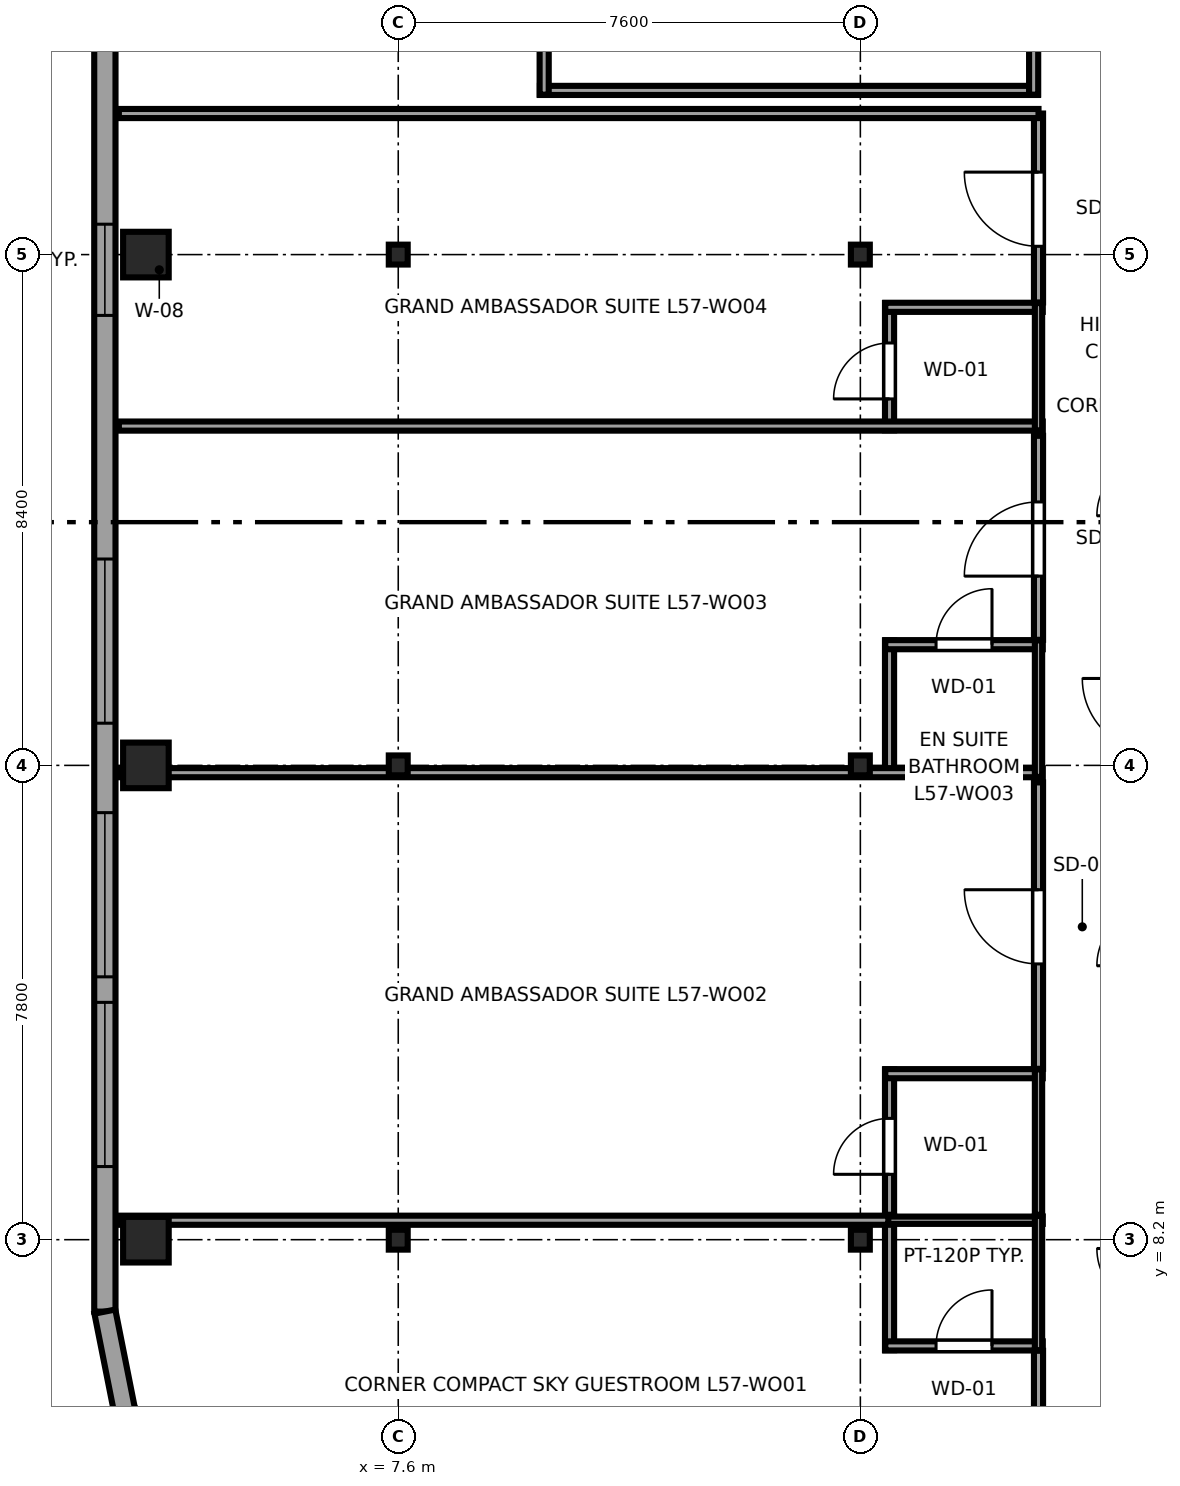
"""IFC4 building model, lengths in metres.
Left out: names, types, materials, properties, quantities, classifications, styles, units other than length and angle.
Written with IfcOpenShell. Run it as: python <this file> out.ifc"""

import sys

from ifc_helpers import new_model, si_unit, direction, frame, frame_2d, origin, origin_2d, place, context, subcontext, project, spatial, rectangle, i_section, extrude, source, transform, mapped, element, fill, save


model = new_model("IFC4")
c1 = context("Model", 3, precision=1e-05, world=origin(), true_north=direction((0.0, 1.0)))
c2 = subcontext(c1, "Body", "Model", "MODEL_VIEW")
j1 = project(units=[si_unit("LENGTHUNIT", "METRE"), si_unit("PLANEANGLEUNIT", "RADIAN")], contexts=[c1])
p1 = place(None, origin())
s1 = spatial("IfcSite", under=j1, at=p1, CompositionType="ELEMENT")
p2 = place(p1, origin())
s2 = spatial("IfcBuilding", under=s1, at=p2, CompositionType="ELEMENT")
p3 = place(p2, frame((0.0, 0.0, 216.8)))
s3 = spatial("IfcBuildingStorey", under=s2, at=p3, CompositionType="ELEMENT", Elevation=216.8)
m1 = source(origin(), c2, "Body", "SweptSolid", [
    extrude(rectangle(XDim=0.75, YDim=0.75, at=origin_2d()), origin(), (0.0, 0.0, 1.0), 3.55),
])
for number, where, z_axis, x_axis in (
    (1, (3.45, 8.2, 0.0), (0.0, 0.0, 1.0), (1.0, 0.0, 0.0)),
    (2, (3.45, 16.0, 0.0), (0.0, 0.0, 1.0), (1.0, 0.0, 0.0)),
    (3, (3.45, 24.4, 0.0), (0.0, 0.0, 1.0), (1.0, 0.0, 0.0)),
):
    element("IfcColumn", number, at=place(p3, frame(where, z_axis=z_axis, x_axis=x_axis)), inside=s3, PredefinedType="COLUMN", context=c2, shape_type="MappedRepresentation", body=[
        mapped(m1, transform((0.0, 0.0, 0.0), x_axis=(1.0, 0.0, 0.0), y_axis=(0.0, 1.0, 0.0), z_axis=(0.0, 0.0, 1.0), scale=1.0)),
    ])
m2 = source(origin(), c2, "Body", "SweptSolid", [
    extrude(i_section(OverallWidth=0.311, OverallDepth=0.327, WebThickness=0.016, FlangeThickness=0.025, FilletRadius=0.017, at=origin_2d()), origin(), (0.0, 0.0, 1.0), 3.55),
])
for number, where, z_axis, x_axis in (
    (4, (7.6, 8.2, 0.0), (0.0, 0.0, 1.0), (1.0, 0.0, 0.0)),
    (5, (7.6, 16.0, 0.0), (0.0, 0.0, 1.0), (1.0, 0.0, 0.0)),
    (6, (7.6, 24.4, 0.0), (0.0, 0.0, 1.0), (1.0, 0.0, 0.0)),
    (7, (15.2, 8.2, 0.0), (0.0, 0.0, 1.0), (1.0, 0.0, 0.0)),
    (8, (15.2, 16.0, 0.0), (0.0, 0.0, 1.0), (1.0, 0.0, 0.0)),
    (9, (15.2, 24.4, 0.0), (0.0, 0.0, 1.0), (1.0, 0.0, 0.0)),
):
    element("IfcColumn", number, at=place(p3, frame(where, z_axis=z_axis, x_axis=x_axis)), inside=s3, PredefinedType="COLUMN", context=c2, shape_type="MappedRepresentation", body=[
        mapped(m2, transform((0.0, 0.0, 0.0), x_axis=(1.0, 0.0, 0.0), y_axis=(0.0, 1.0, 0.0), z_axis=(0.0, 0.0, 1.0), scale=1.0)),
    ])
p4 = place(p3, frame((3.1, 5.385, 0.0), z_axis=(0.0, 0.0, 1.0), x_axis=(0.555623290322, -0.831434158098, 0.0)))
e10 = element("IfcWall", 10, at=p4, inside=s3, PredefinedType="SOLIDWALL", context=c2, shape_type="SweptSolid", body=[
    extrude(rectangle(XDim=1.647, YDim=0.35, at=frame_2d((0.824, 0.0))), origin(), (0.0, 0.0, 1.0), 2.9),
])
p5 = place(p3, frame((2.775, 41.583, 0.0), z_axis=(0.0, 0.0, 1.0), x_axis=(0.0, -1.0, 0.0)))
e11 = element("IfcWall", 11, at=p5, inside=s3, PredefinedType="SOLIDWALL", context=c2, shape_type="SweptSolid", body=[
    extrude(rectangle(XDim=34.566, YDim=0.35, at=frame_2d((17.283, 0.0))), origin(), (0.0, 0.0, 1.0), 3.37),
])
p6 = place(p5, frame((10.227, 0.0, 0.68)))
e12 = element("IfcOpeningElement", 12, at=p6, cuts=e11, PredefinedType="OPENING", context=c2, shape_type="SweptSolid", body=[
    extrude(rectangle(XDim=2.7, YDim=1.95, at=frame_2d((1.35, 0.975))), frame((0.0, 0.185, 0.0), z_axis=(0.0, -1.0, 0.0), x_axis=(1.0, 0.0, 0.0)), (0.0, 0.0, 1.0), 0.37),
])
p7 = place(p5, frame((22.189, 0.0, 0.68)))
e13 = element("IfcOpeningElement", 13, at=p7, cuts=e11, PredefinedType="OPENING", context=c2, shape_type="SweptSolid", body=[
    extrude(rectangle(XDim=2.7, YDim=1.95, at=frame_2d((1.35, 0.975))), frame((0.0, 0.185, 0.0), z_axis=(0.0, -1.0, 0.0), x_axis=(1.0, 0.0, 0.0)), (0.0, 0.0, 1.0), 0.37),
])
p8 = place(p5, frame((26.36, 0.0, 0.68)))
e14 = element("IfcOpeningElement", 14, at=p8, cuts=e11, PredefinedType="OPENING", context=c2, shape_type="SweptSolid", body=[
    extrude(rectangle(XDim=2.7, YDim=1.95, at=frame_2d((1.35, 0.975))), frame((0.0, 0.185, 0.0), z_axis=(0.0, -1.0, 0.0), x_axis=(1.0, 0.0, 0.0)), (0.0, 0.0, 1.0), 0.37),
])
p9 = place(p5, frame((29.48, 0.0, 0.68)))
e15 = element("IfcOpeningElement", 15, at=p9, cuts=e11, PredefinedType="OPENING", context=c2, shape_type="SweptSolid", body=[
    extrude(rectangle(XDim=2.7, YDim=1.95, at=frame_2d((1.35, 0.975))), frame((0.0, 0.185, 0.0), z_axis=(0.0, -1.0, 0.0), x_axis=(1.0, 0.0, 0.0)), (0.0, 0.0, 1.0), 0.37),
])
p10 = place(p5, frame((16.683, 0.0, 0.62)))
e16 = element("IfcOpeningElement", 16, at=p10, cuts=e11, PredefinedType="OPENING", context=c2, shape_type="SweptSolid", body=[
    extrude(rectangle(XDim=1.5, YDim=1.55, at=frame_2d((0.75, 0.775))), frame((0.0, 0.185, 0.0), z_axis=(0.0, -1.0, 0.0), x_axis=(1.0, 0.0, 0.0)), (0.0, 0.0, 1.0), 0.37),
])
p11 = place(p3, frame((2.775, 7.017, 0.0), z_axis=(0.0, 0.0, 1.0), x_axis=(0.195072403631, -0.980788844421, 0.0)))
e17 = element("IfcWall", 17, at=p11, inside=s3, PredefinedType="SOLIDWALL", context=c2, shape_type="SweptSolid", body=[
    extrude(rectangle(XDim=1.665, YDim=0.35, at=frame_2d((0.832, 0.0))), origin(), (0.0, 0.0, 1.0), 3.37),
])
p12 = place(p3, frame((15.68, 6.383, 0.0), z_axis=(0.0, 0.0, 1.0), x_axis=(0.0, 1.0, 0.0)))
e18 = element("IfcWall", 18, at=p12, inside=s3, PredefinedType="PARTITIONING", context=c2, shape_type="SweptSolid", body=[
    extrude(rectangle(XDim=2.207, YDim=0.15, at=frame_2d((1.104, 0.0))), origin(), (0.0, 0.0, 1.0), 3.37),
])
p13 = place(p3, frame((15.61, 6.453, 0.0), z_axis=(0.0, 0.0, 1.0), x_axis=(1.0, 0.0, 0.0)))
e19 = element("IfcWall", 19, at=p13, inside=s3, PredefinedType="PARTITIONING", context=c2, shape_type="SweptSolid", body=[
    extrude(rectangle(XDim=2.59, YDim=0.15, at=frame_2d((1.295, 0.0))), origin(), (0.0, 0.0, 1.0), 3.37),
])
p14 = place(p13, frame((0.835, 0.0, 0.0)))
e20 = element("IfcOpeningElement", 20, at=p14, cuts=e19, PredefinedType="OPENING", context=c2, shape_type="SweptSolid", body=[
    extrude(rectangle(XDim=0.92, YDim=2.01, at=frame_2d((0.46, 1.005))), frame((0.0, 0.085, 0.0), z_axis=(0.0, -1.0, 0.0), x_axis=(1.0, 0.0, 0.0)), (0.0, 0.0, 1.0), 0.17),
])
p15 = place(p3, frame((15.61, 8.52, 0.0), z_axis=(0.0, 0.0, 1.0), x_axis=(1.0, 0.0, 0.0)))
e21 = element("IfcWall", 21, at=p15, inside=s3, PredefinedType="PLUMBINGWALL", context=c2, shape_type="SweptSolid", body=[
    extrude(rectangle(XDim=2.59, YDim=0.12, at=frame_2d((1.295, 0.0))), origin(), (0.0, 0.0, 1.0), 3.37),
])
p16 = place(p3, frame((18.13, 6.383, 0.0), z_axis=(0.0, 0.0, 1.0), x_axis=(0.0, 1.0, 0.0)))
e22 = element("IfcWall", 22, at=p16, inside=s3, PredefinedType="PLUMBINGWALL", context=c2, shape_type="SweptSolid", body=[
    extrude(rectangle(XDim=2.207, YDim=0.12, at=frame_2d((1.104, 0.0))), origin(), (0.0, 0.0, 1.0), 3.37),
])
p17 = place(p3, frame((15.68, 8.61, 0.0), z_axis=(0.0, 0.0, 1.0), x_axis=(0.0, 1.0, 0.0)))
e23 = element("IfcWall", 23, at=p17, inside=s3, PredefinedType="PARTITIONING", context=c2, shape_type="SweptSolid", body=[
    extrude(rectangle(XDim=2.39, YDim=0.15, at=frame_2d((1.195, 0.0))), origin(), (0.0, 0.0, 1.0), 3.37),
])
p18 = place(p17, frame((0.665, 0.0, 0.0)))
e24 = element("IfcOpeningElement", 24, at=p18, cuts=e23, PredefinedType="OPENING", context=c2, shape_type="SweptSolid", body=[
    extrude(rectangle(XDim=0.92, YDim=2.01, at=frame_2d((0.46, 1.005))), frame((0.0, 0.085, 0.0), z_axis=(0.0, -1.0, 0.0), x_axis=(1.0, 0.0, 0.0)), (0.0, 0.0, 1.0), 0.17),
])
p19 = place(p3, frame((15.61, 10.93, 0.0), z_axis=(0.0, 0.0, 1.0), x_axis=(1.0, 0.0, 0.0)))
e25 = element("IfcWall", 25, at=p19, inside=s3, PredefinedType="PARTITIONING", context=c2, shape_type="SweptSolid", body=[
    extrude(rectangle(XDim=2.59, YDim=0.15, at=frame_2d((1.295, 0.0))), origin(), (0.0, 0.0, 1.0), 3.37),
])
p20 = place(p3, frame((18.13, 8.61, 0.0), z_axis=(0.0, 0.0, 1.0), x_axis=(0.0, 1.0, 0.0)))
e26 = element("IfcWall", 26, at=p20, inside=s3, PredefinedType="PLUMBINGWALL", context=c2, shape_type="SweptSolid", body=[
    extrude(rectangle(XDim=2.39, YDim=0.12, at=frame_2d((1.195, 0.0))), origin(), (0.0, 0.0, 1.0), 3.37),
])
p21 = place(p3, frame((15.68, 15.81, 0.0), z_axis=(0.0, 0.0, 1.0), x_axis=(0.0, 1.0, 0.0)))
e27 = element("IfcWall", 27, at=p21, inside=s3, PredefinedType="PARTITIONING", context=c2, shape_type="SweptSolid", body=[
    extrude(rectangle(XDim=2.245, YDim=0.15, at=frame_2d((1.123, 0.0))), origin(), (0.0, 0.0, 1.0), 3.37),
])
p22 = place(p3, frame((3.005, 15.88, 0.0), z_axis=(0.0, 0.0, 1.0), x_axis=(1.0, 0.0, 0.0)))
e28 = element("IfcWall", 28, at=p22, inside=s3, PredefinedType="PARTITIONING", context=c2, shape_type="SweptSolid", body=[
    extrude(rectangle(XDim=15.195, YDim=0.15, at=frame_2d((7.598, 0.0))), origin(), (0.0, 0.0, 1.0), 2.758),
])
p23 = place(p3, frame((15.61, 17.985, 0.0), z_axis=(0.0, 0.0, 1.0), x_axis=(1.0, 0.0, 0.0)))
e29 = element("IfcWall", 29, at=p23, inside=s3, PredefinedType="PARTITIONING", context=c2, shape_type="SweptSolid", body=[
    extrude(rectangle(XDim=2.59, YDim=0.15, at=frame_2d((1.295, 0.0))), origin(), (0.0, 0.0, 1.0), 3.37),
])
p24 = place(p23, frame((0.835, 0.0, 0.0)))
e30 = element("IfcOpeningElement", 30, at=p24, cuts=e29, PredefinedType="OPENING", context=c2, shape_type="SweptSolid", body=[
    extrude(rectangle(XDim=0.92, YDim=2.01, at=frame_2d((0.46, 1.005))), frame((0.0, 0.085, 0.0), z_axis=(0.0, -1.0, 0.0), x_axis=(1.0, 0.0, 0.0)), (0.0, 0.0, 1.0), 0.17),
])
p25 = place(p3, frame((18.13, 15.81, 0.0), z_axis=(0.0, 0.0, 1.0), x_axis=(0.0, 1.0, 0.0)))
e31 = element("IfcWall", 31, at=p25, inside=s3, PredefinedType="PLUMBINGWALL", context=c2, shape_type="SweptSolid", body=[
    extrude(rectangle(XDim=2.245, YDim=0.12, at=frame_2d((1.123, 0.0))), origin(), (0.0, 0.0, 1.0), 3.37),
])
p26 = place(p3, frame((15.68, 21.51, 0.0), z_axis=(0.0, 0.0, 1.0), x_axis=(0.0, 1.0, 0.0)))
e32 = element("IfcWall", 32, at=p26, inside=s3, PredefinedType="PARTITIONING", context=c2, shape_type="SweptSolid", body=[
    extrude(rectangle(XDim=2.093, YDim=0.15, at=frame_2d((1.046, 0.0))), origin(), (0.0, 0.0, 1.0), 3.37),
])
p27 = place(p26, frame((0.517, 0.0, 0.0)))
e33 = element("IfcOpeningElement", 33, at=p27, cuts=e32, PredefinedType="OPENING", context=c2, shape_type="SweptSolid", body=[
    extrude(rectangle(XDim=0.92, YDim=2.01, at=frame_2d((0.46, 1.005))), frame((0.0, 0.085, 0.0), z_axis=(0.0, -1.0, 0.0), x_axis=(1.0, 0.0, 0.0)), (0.0, 0.0, 1.0), 0.17),
])
p28 = place(p3, frame((3.005, 21.58, 0.0), z_axis=(0.0, 0.0, 1.0), x_axis=(1.0, 0.0, 0.0)))
e34 = element("IfcWall", 34, at=p28, inside=s3, PredefinedType="PARTITIONING", context=c2, shape_type="SweptSolid", body=[
    extrude(rectangle(XDim=15.195, YDim=0.15, at=frame_2d((7.598, 0.0))), origin(), (0.0, 0.0, 1.0), 3.37),
])
p29 = place(p3, frame((15.61, 23.533, 0.0), z_axis=(0.0, 0.0, 1.0), x_axis=(1.0, 0.0, 0.0)))
e35 = element("IfcWall", 35, at=p29, inside=s3, PredefinedType="PARTITIONING", context=c2, shape_type="SweptSolid", body=[
    extrude(rectangle(XDim=2.59, YDim=0.15, at=frame_2d((1.295, 0.0))), origin(), (0.0, 0.0, 1.0), 3.37),
])
p30 = place(p3, frame((18.13, 21.51, 0.0), z_axis=(0.0, 0.0, 1.0), x_axis=(0.0, 1.0, 0.0)))
e36 = element("IfcWall", 36, at=p30, inside=s3, PredefinedType="PLUMBINGWALL", context=c2, shape_type="SweptSolid", body=[
    extrude(rectangle(XDim=2.093, YDim=0.12, at=frame_2d((1.046, 0.0))), origin(), (0.0, 0.0, 1.0), 3.37),
])
p31 = place(p3, frame((18.13, 3.005, 0.0), z_axis=(0.0, 0.0, 1.0), x_axis=(0.0, 1.0, 0.0)))
e37 = element("IfcWall", 37, at=p31, inside=s3, PredefinedType="PARTITIONING", context=c2, shape_type="SweptSolid", body=[
    extrude(rectangle(XDim=3.368, YDim=0.15, at=frame_2d((1.684, 0.0))), origin(), (0.0, 0.0, 1.0), 3.37),
])
p32 = place(p31, frame((1.082, 0.0, 0.0)))
e38 = element("IfcOpeningElement", 38, at=p32, cuts=e37, PredefinedType="OPENING", context=c2, shape_type="SweptSolid", body=[
    extrude(rectangle(XDim=1.22, YDim=2.08, at=frame_2d((0.61, 1.04))), frame((0.0, 0.085, 0.0), z_axis=(0.0, -1.0, 0.0), x_axis=(1.0, 0.0, 0.0)), (0.0, 0.0, 1.0), 0.17),
])
p33 = place(p3, frame((3.005, 8.52, 0.0), z_axis=(0.0, 0.0, 1.0), x_axis=(1.0, 0.0, 0.0)))
e39 = element("IfcWall", 39, at=p33, inside=s3, PredefinedType="PARTITIONING", context=c2, shape_type="SweptSolid", body=[
    extrude(rectangle(XDim=12.655, YDim=0.15, at=frame_2d((6.328, 0.0))), origin(), (0.0, 0.0, 1.0), 3.37),
])
p34 = place(p3, frame((18.13, 11.01, 0.0), z_axis=(0.0, 0.0, 1.0), x_axis=(0.0, 1.0, 0.0)))
e40 = element("IfcWall", 40, at=p34, inside=s3, PredefinedType="PARTITIONING", context=c2, shape_type="SweptSolid", body=[
    extrude(rectangle(XDim=4.71, YDim=0.15, at=frame_2d((2.355, 0.0))), origin(), (0.0, 0.0, 1.0), 3.37),
])
p35 = place(p34, frame((1.725, 0.0, 0.0)))
e41 = element("IfcOpeningElement", 41, at=p35, cuts=e40, PredefinedType="OPENING", context=c2, shape_type="SweptSolid", body=[
    extrude(rectangle(XDim=1.22, YDim=2.08, at=frame_2d((0.61, 1.04))), frame((0.0, 0.085, 0.0), z_axis=(0.0, -1.0, 0.0), x_axis=(1.0, 0.0, 0.0)), (0.0, 0.0, 1.0), 0.17),
])
p36 = place(p3, frame((18.13, 18.065, 0.0), z_axis=(0.0, 0.0, 1.0), x_axis=(0.0, 1.0, 0.0)))
e42 = element("IfcWall", 42, at=p36, inside=s3, PredefinedType="PARTITIONING", context=c2, shape_type="SweptSolid", body=[
    extrude(rectangle(XDim=3.355, YDim=0.15, at=frame_2d((1.677, 0.0))), origin(), (0.0, 0.0, 1.0), 3.37),
])
p37 = place(p36, frame((1.048, 0.0, 0.0)))
e43 = element("IfcOpeningElement", 43, at=p37, cuts=e42, PredefinedType="OPENING", context=c2, shape_type="SweptSolid", body=[
    extrude(rectangle(XDim=1.22, YDim=2.08, at=frame_2d((0.61, 1.04))), frame((0.0, 0.085, 0.0), z_axis=(0.0, -1.0, 0.0), x_axis=(1.0, 0.0, 0.0)), (0.0, 0.0, 1.0), 0.17),
])
p38 = place(p3, frame((18.13, 23.613, 0.0), z_axis=(0.0, 0.0, 1.0), x_axis=(0.0, 1.0, 0.0)))
e44 = element("IfcWall", 44, at=p38, inside=s3, PredefinedType="PARTITIONING", context=c2, shape_type="SweptSolid", body=[
    extrude(rectangle(XDim=3.107, YDim=0.15, at=frame_2d((1.553, 0.0))), origin(), (0.0, 0.0, 1.0), 3.37),
])
p39 = place(p38, frame((0.924, 0.0, 0.0)))
e45 = element("IfcOpeningElement", 45, at=p39, cuts=e44, PredefinedType="OPENING", context=c2, shape_type="SweptSolid", body=[
    extrude(rectangle(XDim=1.22, YDim=2.08, at=frame_2d((0.61, 1.04))), frame((0.0, 0.085, 0.0), z_axis=(0.0, -1.0, 0.0), x_axis=(1.0, 0.0, 0.0)), (0.0, 0.0, 1.0), 0.17),
])
p40 = place(p3, frame((3.005, 26.72, 0.0), z_axis=(0.0, 0.0, 1.0), x_axis=(1.0, 0.0, 0.0)))
e46 = element("IfcWall", 46, at=p40, inside=s3, PredefinedType="PARTITIONING", context=c2, shape_type="SweptSolid", body=[
    extrude(rectangle(XDim=15.125, YDim=0.15, at=frame_2d((7.562, 0.0))), origin(), (0.0, 0.0, 1.0), 3.37),
])
p41 = place(p3, frame((9.93, 27.1, 0.0), z_axis=(0.0, 0.0, 1.0), x_axis=(1.0, 0.0, 0.0)))
e47 = element("IfcWall", 47, at=p41, inside=s3, PredefinedType="PARTITIONING", context=c2, shape_type="SweptSolid", body=[
    extrude(rectangle(XDim=8.19, YDim=0.15, at=frame_2d((4.095, 0.0))), origin(), (0.0, 0.0, 1.0), 3.37),
])
for number, where, z_axis, x_axis in (
    (48, (10.0, 27.03, 0.0), (0.0, 0.0, 1.0), (0.0, 1.0, 0.0)),
    (49, (18.05, 27.03, 0.0), (0.0, 0.0, 1.0), (0.0, 1.0, 0.0)),
):
    element("IfcWall", number, at=place(p3, frame(where, z_axis=z_axis, x_axis=x_axis)), inside=s3, PredefinedType="PARTITIONING", context=c2, shape_type="SweptSolid", body=[
        extrude(rectangle(XDim=2.79, YDim=0.15, at=frame_2d((1.395, 0.0))), origin(), (0.0, 0.0, 1.0), 3.37),
    ])
m3 = source(origin(), c2, "Body", "SweptSolid", [
    extrude(rectangle(XDim=2.7, YDim=1.95, at=frame_2d((1.35, 0.975))), frame((0.0, 0.09, 0.0), z_axis=(0.0, -1.0, 0.0), x_axis=(1.0, 0.0, 0.0)), (0.0, 0.0, 1.0), 0.06),
])
p42 = place(p7, origin())
e50 = element("IfcWindow", 50, at=p42, inside=s3, PartitioningType="TRIPLE_PANEL_HORIZONTAL", PredefinedType="WINDOW", context=c2, shape_type="MappedRepresentation", body=[
    mapped(m3, transform((0.0, 0.0, 0.0), x_axis=(1.0, 0.0, 0.0), y_axis=(0.0, 1.0, 0.0), z_axis=(0.0, 0.0, 1.0), scale=1.0)),
])
fill(e13, e50)
p43 = place(p8, origin())
e51 = element("IfcWindow", 51, at=p43, inside=s3, PartitioningType="TRIPLE_PANEL_HORIZONTAL", PredefinedType="WINDOW", context=c2, shape_type="MappedRepresentation", body=[
    mapped(m3, transform((0.0, 0.0, 0.0), x_axis=(1.0, 0.0, 0.0), y_axis=(0.0, 1.0, 0.0), z_axis=(0.0, 0.0, 1.0), scale=1.0)),
])
fill(e14, e51)
p44 = place(p9, origin())
e52 = element("IfcWindow", 52, at=p44, inside=s3, PartitioningType="TRIPLE_PANEL_HORIZONTAL", PredefinedType="WINDOW", context=c2, shape_type="MappedRepresentation", body=[
    mapped(m3, transform((0.0, 0.0, 0.0), x_axis=(1.0, 0.0, 0.0), y_axis=(0.0, 1.0, 0.0), z_axis=(0.0, 0.0, 1.0), scale=1.0)),
])
fill(e15, e52)
m4 = source(origin(), c2, "Body", "SweptSolid", [
    extrude(rectangle(XDim=1.5, YDim=1.55, at=frame_2d((0.75, 0.775))), frame((0.0, 0.09, 0.0), z_axis=(0.0, -1.0, 0.0), x_axis=(1.0, 0.0, 0.0)), (0.0, 0.0, 1.0), 0.06),
])
p45 = place(p10, origin())
e53 = element("IfcWindow", 53, at=p45, inside=s3, PartitioningType="SINGLE_PANEL", PredefinedType="WINDOW", context=c2, shape_type="MappedRepresentation", body=[
    mapped(m4, transform((0.0, 0.0, 0.0), x_axis=(1.0, 0.0, 0.0), y_axis=(0.0, 1.0, 0.0), z_axis=(0.0, 0.0, 1.0), scale=1.0)),
])
fill(e16, e53)
m5 = source(origin(), c2, "Body", "SweptSolid", [
    extrude(rectangle(XDim=0.92, YDim=2.01, at=frame_2d((0.46, 1.005))), frame((0.0, 0.025, 0.0), z_axis=(0.0, -1.0, 0.0), x_axis=(1.0, 0.0, 0.0)), (0.0, 0.0, 1.0), 0.05),
])
p46 = place(p14, origin())
e54 = element("IfcDoor", 54, at=p46, inside=s3, OperationType="SINGLE_SWING_RIGHT", PredefinedType="DOOR", context=c2, shape_type="MappedRepresentation", body=[
    mapped(m5, transform((0.0, 0.0, 0.0), x_axis=(1.0, 0.0, 0.0), y_axis=(0.0, 1.0, 0.0), z_axis=(0.0, 0.0, 1.0), scale=1.0)),
])
fill(e20, e54)
p47 = place(p18, origin())
e55 = element("IfcDoor", 55, at=p47, inside=s3, OperationType="SINGLE_SWING_LEFT", PredefinedType="DOOR", context=c2, shape_type="MappedRepresentation", body=[
    mapped(m5, transform((0.0, 0.0, 0.0), x_axis=(1.0, 0.0, 0.0), y_axis=(0.0, 1.0, 0.0), z_axis=(0.0, 0.0, 1.0), scale=1.0)),
])
fill(e24, e55)
p48 = place(p24, origin())
e56 = element("IfcDoor", 56, at=p48, inside=s3, OperationType="SINGLE_SWING_RIGHT", PredefinedType="DOOR", context=c2, shape_type="MappedRepresentation", body=[
    mapped(m5, transform((0.0, 0.0, 0.0), x_axis=(1.0, 0.0, 0.0), y_axis=(0.0, 1.0, 0.0), z_axis=(0.0, 0.0, 1.0), scale=1.0)),
])
fill(e30, e56)
p49 = place(p27, origin())
e57 = element("IfcDoor", 57, at=p49, inside=s3, OperationType="SINGLE_SWING_LEFT", PredefinedType="DOOR", context=c2, shape_type="MappedRepresentation", body=[
    mapped(m5, transform((0.0, 0.0, 0.0), x_axis=(1.0, 0.0, 0.0), y_axis=(0.0, 1.0, 0.0), z_axis=(0.0, 0.0, 1.0), scale=1.0)),
])
fill(e33, e57)
m6 = source(origin(), c2, "Body", "SweptSolid", [
    extrude(rectangle(XDim=1.22, YDim=2.08, at=frame_2d((0.61, 1.04))), frame((0.0, 0.025, 0.0), z_axis=(0.0, -1.0, 0.0), x_axis=(1.0, 0.0, 0.0)), (0.0, 0.0, 1.0), 0.05),
])
p50 = place(p35, origin())
e58 = element("IfcDoor", 58, at=p50, inside=s3, OperationType="SINGLE_SWING_RIGHT", PredefinedType="DOOR", context=c2, shape_type="MappedRepresentation", body=[
    mapped(m6, transform((0.0, 0.0, 0.0), x_axis=(1.0, 0.0, 0.0), y_axis=(0.0, 1.0, 0.0), z_axis=(0.0, 0.0, 1.0), scale=1.0)),
])
fill(e41, e58)
p51 = place(p37, origin())
e59 = element("IfcDoor", 59, at=p51, inside=s3, OperationType="SINGLE_SWING_LEFT", PredefinedType="DOOR", context=c2, shape_type="MappedRepresentation", body=[
    mapped(m6, transform((0.0, 0.0, 0.0), x_axis=(1.0, 0.0, 0.0), y_axis=(0.0, 1.0, 0.0), z_axis=(0.0, 0.0, 1.0), scale=1.0)),
])
fill(e43, e59)
p52 = place(p39, origin())
e60 = element("IfcDoor", 60, at=p52, inside=s3, OperationType="SINGLE_SWING_RIGHT", PredefinedType="DOOR", context=c2, shape_type="MappedRepresentation", body=[
    mapped(m6, transform((0.0, 0.0, 0.0), x_axis=(1.0, 0.0, 0.0), y_axis=(0.0, 1.0, 0.0), z_axis=(0.0, 0.0, 1.0), scale=1.0)),
])
fill(e45, e60)
save(model, sys.argv[1])
